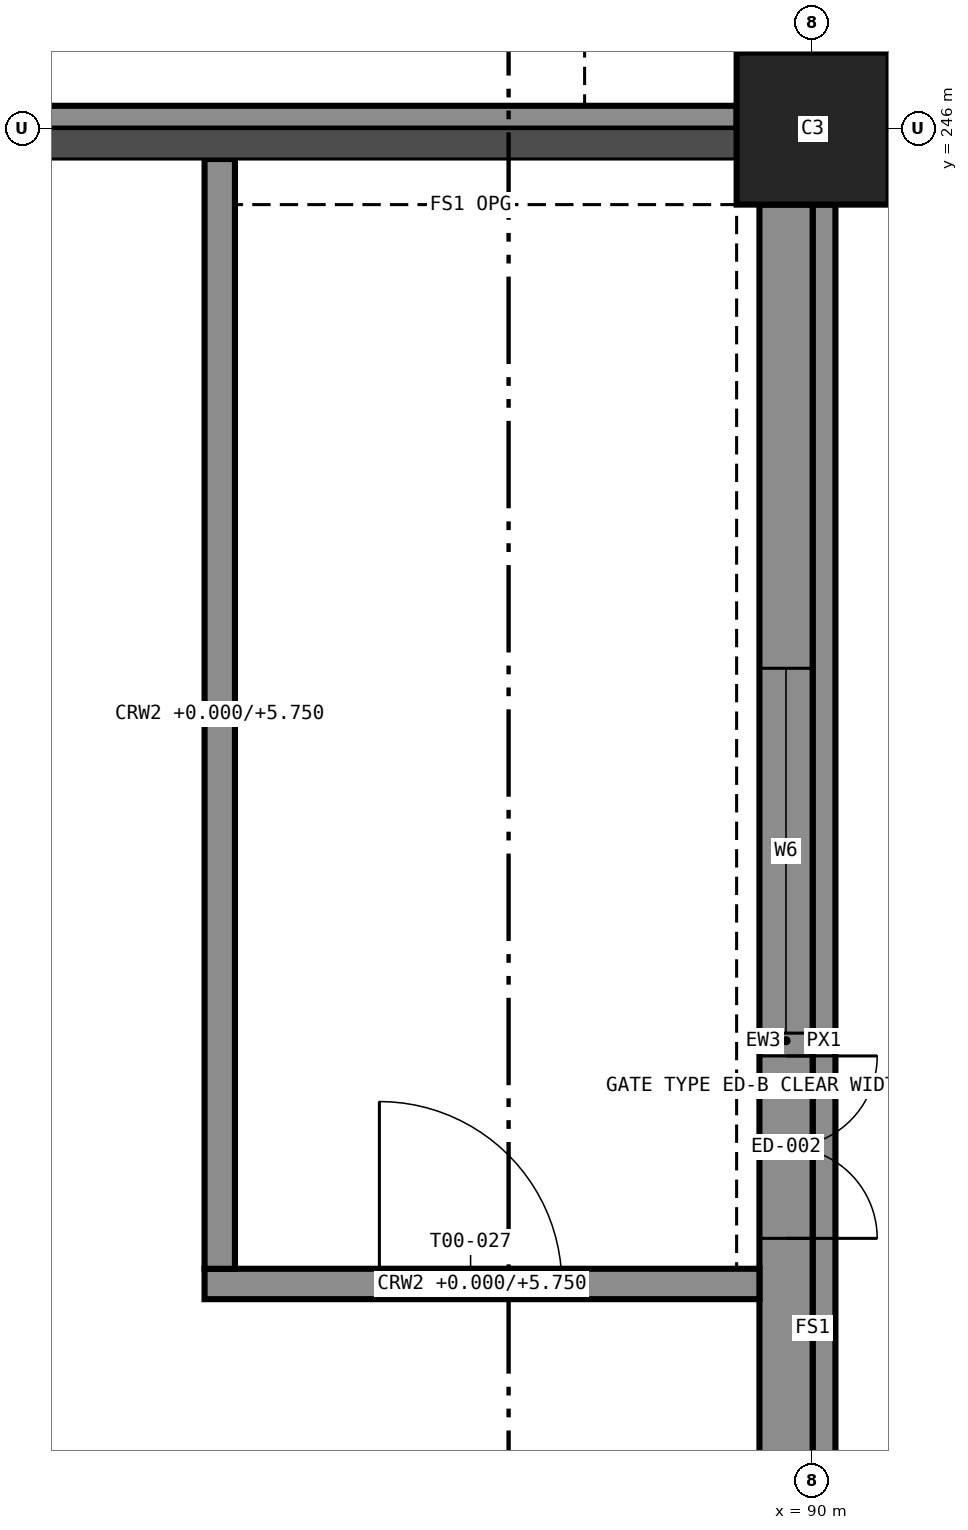
"""IFC4 building model, lengths in metres.
Left out: names, types, materials, properties, quantities, classifications, styles, units other than length and angle.
Written with IfcOpenShell. Run it as: python <this file> out.ifc"""

import sys

from ifc_helpers import new_model, si_unit, direction, frame, frame_2d, origin, origin_2d, place, context, subcontext, project, spatial, rectangle, extrude, element, fill, save


model = new_model("IFC4")
c1 = context("Model", 3, precision=1e-05, world=origin(), true_north=direction((0.0, 1.0)))
c2 = subcontext(c1, "Body", "Model", "MODEL_VIEW")
j1 = project(units=[si_unit("LENGTHUNIT", "METRE"), si_unit("PLANEANGLEUNIT", "RADIAN")], contexts=[c1])
p1 = place(None, origin())
s1 = spatial("IfcSite", under=j1, at=p1, CompositionType="ELEMENT")
p2 = place(p1, origin())
s2 = spatial("IfcBuilding", under=s1, at=p2, CompositionType="ELEMENT")
p3 = place(p2, origin())
s3 = spatial("IfcBuildingStorey", under=s2, at=p3, CompositionType="ELEMENT", Elevation=0.0)
p4 = place(p3, frame((90.0, 246.0, 0.0), z_axis=(0.0, 0.0, 1.0), x_axis=(1.0, 0.0, 0.0)))
e1 = element("IfcColumn", 1, at=p4, inside=s3, PredefinedType="COLUMN", context=c2, shape_type="SweptSolid", body=[
    extrude(rectangle(XDim=1.0, YDim=1.0, at=origin_2d()), origin(), (0.0, 0.0, 1.0), 6.0),
])
p5 = place(p3, frame((86.0, 238.4, 0.0), z_axis=(0.0, 0.0, 1.0), x_axis=(1.0, 0.0, 0.0)))
e2 = element("IfcWall", 2, at=p5, inside=s3, PredefinedType="SHEAR", context=c2, shape_type="SweptSolid", body=[
    extrude(rectangle(XDim=3.65, YDim=0.2, at=frame_2d((1.825, 0.0))), origin(), (0.0, 0.0, 1.0), 5.75),
])
p6 = place(p5, frame((1.15, 0.0, 0.0)))
e3 = element("IfcOpeningElement", 3, at=p6, cuts=e2, PredefinedType="OPENING", context=c2, shape_type="SweptSolid", body=[
    extrude(rectangle(XDim=1.2, YDim=2.1, at=frame_2d((0.6, 1.05))), frame((0.0, 0.11, 0.0), z_axis=(0.0, -1.0, 0.0), x_axis=(1.0, 0.0, 0.0)), (0.0, 0.0, 1.0), 0.22),
])
p7 = place(p3, frame((86.1, 238.5, 0.0), z_axis=(0.0, 0.0, 1.0), x_axis=(0.0, 1.0, 0.0)))
e4 = element("IfcWall", 4, at=p7, inside=s3, PredefinedType="SHEAR", context=c2, shape_type="SweptSolid", body=[
    extrude(rectangle(XDim=7.3, YDim=0.2, at=frame_2d((3.65, 0.0))), origin(), (0.0, 0.0, 1.0), 5.75),
])
p8 = place(p3, frame((89.825, 234.5, 0.0), z_axis=(0.0, 0.0, 1.0), x_axis=(0.0, 1.0, 0.0)))
e5 = element("IfcWall", 5, at=p8, inside=s3, PredefinedType="STANDARD", context=c2, shape_type="SweptSolid", body=[
    extrude(rectangle(XDim=11.0, YDim=0.35, at=frame_2d((5.5, 0.0))), origin(), (0.0, 0.0, 1.0), 4.75),
])
p9 = place(p8, frame((4.2, 0.0, 0.0)))
e6 = element("IfcOpeningElement", 6, at=p9, cuts=e5, PredefinedType="OPENING", context=c2, shape_type="SweptSolid", body=[
    extrude(rectangle(XDim=1.2, YDim=2.4, at=frame_2d((0.6, 1.2))), frame((0.0, 0.185, 0.0), z_axis=(0.0, -1.0, 0.0), x_axis=(1.0, 0.0, 0.0)), (0.0, 0.0, 1.0), 0.37),
])
p10 = place(p8, frame((5.55, 0.0, 0.45)))
e7 = element("IfcOpeningElement", 7, at=p10, cuts=e5, PredefinedType="OPENING", context=c2, shape_type="SweptSolid", body=[
    extrude(rectangle(XDim=2.4, YDim=3.0, at=frame_2d((1.2, 1.5))), frame((0.0, 0.185, 0.0), z_axis=(0.0, -1.0, 0.0), x_axis=(1.0, 0.0, 0.0)), (0.0, 0.0, 1.0), 0.37),
])
for number, where, z_axis, x_axis in (
    (8, (90.075, 234.5, 5.75), (0.0, 0.0, 1.0), (0.0, 1.0, 0.0)),
    (9, (89.5, 246.075, 5.75), (0.0, 0.0, 1.0), (-1.0, 0.0, 0.0)),
):
    element("IfcWall", number, at=place(p3, frame(where, z_axis=z_axis, x_axis=x_axis)), inside=s3, PredefinedType="STANDARD", context=c2, shape_type="SweptSolid", body=[
        extrude(rectangle(XDim=11.0, YDim=0.15, at=frame_2d((5.5, 0.0))), origin(), (0.0, 0.0, 1.0), 0.25),
    ])
p11 = place(p9, frame((1.2, 0.0, 0.0), z_axis=(0.0, 0.0, 1.0), x_axis=(-1.0, 0.0, 0.0)))
e10 = element("IfcDoor", 10, at=p11, inside=s3, OperationType="DOUBLE_DOOR_SINGLE_SWING", PredefinedType="DOOR", context=c2, shape_type="SweptSolid", body=[
    extrude(rectangle(XDim=1.2, YDim=2.4, at=frame_2d((0.6, 1.2))), frame((0.0, 0.025, 0.0), z_axis=(0.0, -1.0, 0.0), x_axis=(1.0, 0.0, 0.0)), (0.0, 0.0, 1.0), 0.05),
])
fill(e6, e10)
p12 = place(p10, origin())
e11 = element("IfcWindow", 11, at=p12, inside=s3, PartitioningType="SINGLE_PANEL", PredefinedType="WINDOW", context=c2, shape_type="SweptSolid", body=[
    extrude(rectangle(XDim=2.4, YDim=3.0, at=frame_2d((1.2, 1.5))), frame((0.0, 0.03, 0.0), z_axis=(0.0, -1.0, 0.0), x_axis=(1.0, 0.0, 0.0)), (0.0, 0.0, 1.0), 0.06),
])
fill(e7, e11)
p13 = place(p6, origin())
e12 = element("IfcDoor", 12, at=p13, inside=s3, OperationType="SINGLE_SWING_LEFT", PredefinedType="DOOR", context=c2, shape_type="SweptSolid", body=[
    extrude(rectangle(XDim=1.2, YDim=2.1, at=frame_2d((0.6, 1.05))), frame((0.0, 0.025, 0.0), z_axis=(0.0, -1.0, 0.0), x_axis=(1.0, 0.0, 0.0)), (0.0, 0.0, 1.0), 0.05),
])
fill(e3, e12)
save(model, sys.argv[1])
